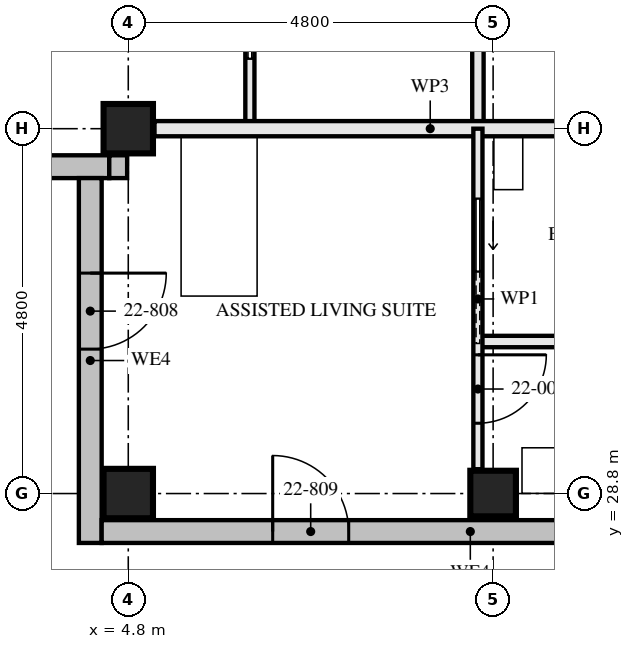
"""IFC4 building model, lengths in metres.
Left out: names, types, materials, properties, quantities, classifications, styles, units other than length and angle.
Written with IfcOpenShell. Run it as: python <this file> out.ifc"""

import sys

from ifc_helpers import new_model, si_unit, direction, frame, frame_2d, origin, origin_2d, place, context, subcontext, project, spatial, rectangle, hollow_rectangle, extrude, element, fill, save


model = new_model("IFC4")
c1 = context("Model", 3, precision=1e-05, world=origin(), true_north=direction((0.0, 1.0)))
c2 = subcontext(c1, "Body", "Model", "MODEL_VIEW")
j1 = project(units=[si_unit("LENGTHUNIT", "METRE"), si_unit("PLANEANGLEUNIT", "RADIAN")], contexts=[c1])
p1 = place(None, origin())
s1 = spatial("IfcSite", under=j1, at=p1, CompositionType="ELEMENT")
p2 = place(p1, origin())
s2 = spatial("IfcBuilding", under=s1, at=p2, CompositionType="ELEMENT")
p3 = place(p2, frame((0.0, 0.0, 84.0)))
s3 = spatial("IfcBuildingStorey", under=s2, at=p3, CompositionType="ELEMENT", Elevation=84.0)
for number, where, z_axis, x_axis in (
    (1, (4.8, 28.8, 0.0), (0.0, 0.0, 1.0), (0.0, 1.0, 0.0)),
    (2, (4.8, 33.6, 0.0), (0.0, 0.0, 1.0), (0.0, 1.0, 0.0)),
):
    element("IfcColumn", number, at=place(p3, frame(where, z_axis=z_axis, x_axis=x_axis)), inside=s3, PredefinedType="COLUMN", context=c2, shape_type="SweptSolid", body=[
        extrude(hollow_rectangle(XDim=0.65, YDim=0.65, WallThickness=0.08, at=origin_2d()), origin(), (0.0, 0.0, 1.0), 3.5),
    ])
p4 = place(p3, frame((9.6, 28.8, 0.0), z_axis=(0.0, 0.0, 1.0), x_axis=(0.0, 1.0, 0.0)))
e3 = element("IfcColumn", 3, at=p4, inside=s3, PredefinedType="COLUMN", context=c2, shape_type="SweptSolid", body=[
    extrude(hollow_rectangle(XDim=0.6, YDim=0.6, WallThickness=0.08, at=origin_2d()), origin(), (0.0, 0.0, 1.0), 3.5),
])
p5 = place(p3, frame((-0.35, 33.1, 0.0), z_axis=(0.0, 0.0, 1.0), x_axis=(1.0, 0.0, 0.0)))
e4 = element("IfcWall", 4, at=p5, inside=s3, PredefinedType="SOLIDWALL", context=c2, shape_type="SweptSolid", body=[
    extrude(rectangle(XDim=4.9, YDim=0.3, at=frame_2d((2.45, 0.0))), origin(), (0.0, 0.0, 1.0), 3.5),
])
p6 = place(p5, frame((2.25, 0.0, 0.0)))
e5 = element("IfcOpeningElement", 5, at=p6, cuts=e4, PredefinedType="OPENING", context=c2, shape_type="SweptSolid", body=[
    extrude(rectangle(XDim=1.0, YDim=2.4, at=frame_2d((0.5, 1.2))), frame((0.0, 0.161, 0.0), z_axis=(0.0, -1.0, 0.0), x_axis=(1.0, 0.0, 0.0)), (0.0, 0.0, 1.0), 0.321),
])
p7 = place(p3, frame((4.3, 32.95, 0.0), z_axis=(0.0, 0.0, 1.0), x_axis=(0.0, -1.0, 0.0)))
e6 = element("IfcWall", 6, at=p7, inside=s3, PredefinedType="SOLIDWALL", context=c2, shape_type="SweptSolid", body=[
    extrude(rectangle(XDim=4.8, YDim=0.3, at=frame_2d((2.4, 0.0))), origin(), (0.0, 0.0, 1.0), 3.5),
])
p8 = place(p7, frame((1.25, 0.0, 0.0)))
e7 = element("IfcOpeningElement", 7, at=p8, cuts=e6, PredefinedType="OPENING", context=c2, shape_type="SweptSolid", body=[
    extrude(rectangle(XDim=1.0, YDim=2.4, at=frame_2d((0.5, 1.2))), frame((0.0, 0.161, 0.0), z_axis=(0.0, -1.0, 0.0), x_axis=(1.0, 0.0, 0.0)), (0.0, 0.0, 1.0), 0.321),
])
p9 = place(p3, frame((4.45, 28.3, 0.0), z_axis=(0.0, 0.0, 1.0), x_axis=(1.0, 0.0, 0.0)))
e8 = element("IfcWall", 8, at=p9, inside=s3, PredefinedType="SOLIDWALL", context=c2, shape_type="SweptSolid", body=[
    extrude(rectangle(XDim=9.7, YDim=0.3, at=frame_2d((4.85, 0.0))), origin(), (0.0, 0.0, 1.0), 3.5),
])
p10 = place(p9, frame((2.25, 0.0, 0.0)))
e9 = element("IfcOpeningElement", 9, at=p10, cuts=e8, PredefinedType="OPENING", context=c2, shape_type="SweptSolid", body=[
    extrude(rectangle(XDim=1.0, YDim=2.4, at=frame_2d((0.5, 1.2))), frame((0.0, 0.161, 0.0), z_axis=(0.0, -1.0, 0.0), x_axis=(1.0, 0.0, 0.0)), (0.0, 0.0, 1.0), 0.321),
])
p11 = place(p9, frame((6.35, 0.0, 0.6)))
e10 = element("IfcOpeningElement", 10, at=p11, cuts=e8, PredefinedType="OPENING", context=c2, shape_type="SweptSolid", body=[
    extrude(rectangle(XDim=2.4, YDim=1.8, at=frame_2d((1.2, 0.9))), frame((0.0, 0.161, 0.0), z_axis=(0.0, -1.0, 0.0), x_axis=(1.0, 0.0, 0.0)), (0.0, 0.0, 1.0), 0.321),
])
p12 = place(p3, frame((4.55, 33.1, 2.39), z_axis=(0.0, 0.0, 1.0), x_axis=(1.0, 0.0, 0.0)))
e11 = element("IfcWall", 11, at=p12, inside=s3, PredefinedType="SOLIDWALL", context=c2, shape_type="SweptSolid", body=[
    extrude(rectangle(XDim=0.235, YDim=0.3, at=frame_2d((0.117, 0.0))), origin(), (0.0, 0.0, 1.0), 0.88),
])
p13 = place(p3, frame((9.4, 36.4, 0.0), z_axis=(0.0, 0.0, 1.0), x_axis=(0.0, -1.0, 0.0)))
e12 = element("IfcWall", 12, at=p13, inside=s3, PredefinedType="PARTITIONING", context=c2, shape_type="SweptSolid", body=[
    extrude(rectangle(XDim=2.8, YDim=0.15, at=frame_2d((1.4, 0.0))), origin(), (0.0, 0.0, 1.0), 3.33),
])
p14 = place(p3, frame((6.4, 38.4, 0.0), z_axis=(0.0, 0.0, 1.0), x_axis=(0.0, -1.0, 0.0)))
e13 = element("IfcWall", 13, at=p14, inside=s3, PredefinedType="PARTITIONING", context=c2, shape_type="SweptSolid", body=[
    extrude(rectangle(XDim=4.8, YDim=0.12, at=frame_2d((2.4, 0.0))), origin(), (0.0, 0.0, 1.0), 3.33),
])
p15 = place(p14, frame((0.45, 0.0, 0.0)))
e14 = element("IfcOpeningElement", 14, at=p15, cuts=e13, PredefinedType="OPENING", context=c2, shape_type="SweptSolid", body=[
    extrude(rectangle(XDim=0.9, YDim=2.1, at=frame_2d((0.45, 1.05))), frame((0.0, 0.071, 0.0), z_axis=(0.0, -1.0, 0.0), x_axis=(1.0, 0.0, 0.0)), (0.0, 0.0, 1.0), 0.141),
])
p16 = place(p14, frame((2.925, 0.0, 0.0)))
e15 = element("IfcOpeningElement", 15, at=p16, cuts=e13, PredefinedType="OPENING", context=c2, shape_type="SweptSolid", body=[
    extrude(rectangle(XDim=0.95, YDim=2.1, at=frame_2d((0.475, 1.05))), frame((0.0, 0.071, 0.0), z_axis=(0.0, -1.0, 0.0), x_axis=(1.0, 0.0, 0.0)), (0.0, 0.0, 1.0), 0.141),
])
p17 = place(p3, frame((5.145, 33.6, 0.0), z_axis=(0.0, 0.0, 1.0), x_axis=(1.0, 0.0, 0.0)))
e16 = element("IfcWall", 16, at=p17, inside=s3, PredefinedType="PARTITIONING", context=c2, shape_type="SweptSolid", body=[
    extrude(rectangle(XDim=7.255, YDim=0.2, at=frame_2d((3.627, 0.0))), origin(), (0.0, 0.0, 1.0), 2.55),
])
p18 = place(p3, frame((9.4, 30.8, 0.0), z_axis=(0.0, 0.0, 1.0), x_axis=(1.0, 0.0, 0.0)))
e17 = element("IfcWall", 17, at=p18, inside=s3, PredefinedType="PARTITIONING", context=c2, shape_type="SweptSolid", body=[
    extrude(rectangle(XDim=3.0, YDim=0.15, at=frame_2d((1.5, 0.0))), origin(), (0.0, 0.0, 1.0), 3.33),
])
p19 = place(p3, frame((9.4, 33.6, 0.0), z_axis=(0.0, 0.0, 1.0), x_axis=(0.0, -1.0, 0.0)))
e18 = element("IfcWall", 18, at=p19, inside=s3, PredefinedType="PARTITIONING", context=c2, shape_type="SweptSolid", body=[
    extrude(rectangle(XDim=4.48, YDim=0.12, at=frame_2d((2.24, 0.0))), origin(), (0.0, 0.0, 1.0), 3.33),
])
p20 = place(p19, frame((2.975, 0.0, 0.0)))
e19 = element("IfcOpeningElement", 19, at=p20, cuts=e18, PredefinedType="OPENING", context=c2, shape_type="SweptSolid", body=[
    extrude(rectangle(XDim=0.9, YDim=2.1, at=frame_2d((0.45, 1.05))), frame((0.0, 0.071, 0.0), z_axis=(0.0, -1.0, 0.0), x_axis=(1.0, 0.0, 0.0)), (0.0, 0.0, 1.0), 0.141),
])
p21 = place(p19, frame((0.925, 0.0, 0.0)))
e20 = element("IfcOpeningElement", 20, at=p21, cuts=e18, PredefinedType="OPENING", context=c2, shape_type="SweptSolid", body=[
    extrude(rectangle(XDim=0.95, YDim=2.1, at=frame_2d((0.475, 1.05))), frame((0.0, 0.071, 0.0), z_axis=(0.0, -1.0, 0.0), x_axis=(1.0, 0.0, 0.0)), (0.0, 0.0, 1.0), 0.141),
])
p22 = place(p8, origin())
e21 = element("IfcDoor", 21, at=p22, inside=s3, OperationType="SINGLE_SWING_LEFT", PredefinedType="DOOR", context=c2, shape_type="SweptSolid", body=[
    extrude(rectangle(XDim=1.0, YDim=2.4, at=frame_2d((0.5, 1.2))), frame((0.0, 0.035, 0.0), z_axis=(0.0, -1.0, 0.0), x_axis=(1.0, 0.0, 0.0)), (0.0, 0.0, 1.0), 0.07),
])
fill(e7, e21)
p23 = place(p10, origin())
e22 = element("IfcDoor", 22, at=p23, inside=s3, OperationType="SINGLE_SWING_LEFT", PredefinedType="DOOR", context=c2, shape_type="SweptSolid", body=[
    extrude(rectangle(XDim=1.0, YDim=2.4, at=frame_2d((0.5, 1.2))), frame((0.0, 0.035, 0.0), z_axis=(0.0, -1.0, 0.0), x_axis=(1.0, 0.0, 0.0)), (0.0, 0.0, 1.0), 0.07),
])
fill(e9, e22)
p24 = place(p16, origin())
e23 = element("IfcDoor", 23, at=p24, inside=s3, OperationType="SLIDING_TO_RIGHT", PredefinedType="DOOR", context=c2, shape_type="SweptSolid", body=[
    extrude(rectangle(XDim=0.95, YDim=2.1, at=frame_2d((0.475, 1.05))), frame((0.0, 0.022, 0.0), z_axis=(0.0, -1.0, 0.0), x_axis=(1.0, 0.0, 0.0)), (0.0, 0.0, 1.0), 0.044),
])
fill(e15, e23)
p25 = place(p20, origin())
e24 = element("IfcDoor", 24, at=p25, inside=s3, OperationType="SINGLE_SWING_RIGHT", PredefinedType="DOOR", context=c2, shape_type="SweptSolid", body=[
    extrude(rectangle(XDim=0.9, YDim=2.1, at=frame_2d((0.45, 1.05))), frame((0.0, 0.022, 0.0), z_axis=(0.0, -1.0, 0.0), x_axis=(1.0, 0.0, 0.0)), (0.0, 0.0, 1.0), 0.044),
])
fill(e19, e24)
p26 = place(p21, origin())
e25 = element("IfcDoor", 25, at=p26, inside=s3, OperationType="SLIDING_TO_LEFT", PredefinedType="DOOR", context=c2, shape_type="SweptSolid", body=[
    extrude(rectangle(XDim=0.95, YDim=2.1, at=frame_2d((0.475, 1.05))), frame((0.0, 0.022, 0.0), z_axis=(0.0, -1.0, 0.0), x_axis=(1.0, 0.0, 0.0)), (0.0, 0.0, 1.0), 0.044),
])
fill(e20, e25)
save(model, sys.argv[1])
